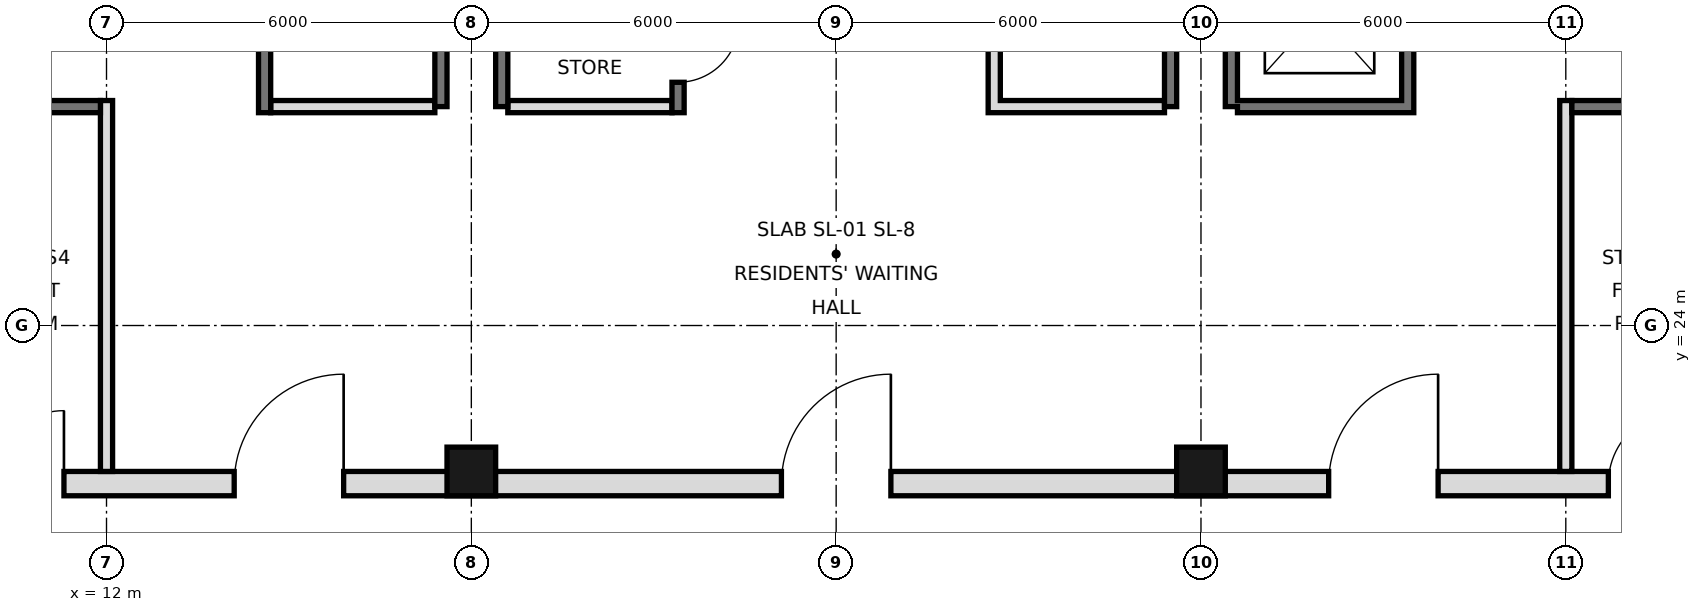
"""IFC4 building model, lengths in metres.
Left out: names, types, materials, properties, quantities, classifications, styles, units other than length and angle.
Written with IfcOpenShell. Run it as: python <this file> out.ifc"""

import sys

from ifc_helpers import new_model, si_unit, direction, frame, frame_2d, origin, origin_2d, place, context, subcontext, project, spatial, rectangle, hollow_rectangle, extrude, element, fill, save


model = new_model("IFC4")
c1 = context("Model", 3, precision=1e-05, world=origin(), true_north=direction((0.0, 1.0)))
c2 = subcontext(c1, "Body", "Model", "MODEL_VIEW")
j1 = project(units=[si_unit("LENGTHUNIT", "METRE"), si_unit("PLANEANGLEUNIT", "RADIAN")], contexts=[c1])
p1 = place(None, origin())
s1 = spatial("IfcSite", under=j1, at=p1, CompositionType="ELEMENT")
p2 = place(p1, origin())
s2 = spatial("IfcBuilding", under=s1, at=p2, CompositionType="ELEMENT")
p3 = place(p2, frame((0.0, 0.0, 257.6)))
s3 = spatial("IfcBuildingStorey", under=s2, at=p3, CompositionType="ELEMENT", Elevation=257.6)
for number, where, z_axis, x_axis in (
    (1, (18.0, 21.6, 0.0), (0.0, 0.0, 1.0), (1.0, 0.0, 0.0)),
    (2, (30.0, 21.6, 0.0), (0.0, 0.0, 1.0), (1.0, 0.0, 0.0)),
):
    element("IfcColumn", number, at=place(p3, frame(where, z_axis=z_axis, x_axis=x_axis)), inside=s3, PredefinedType="COLUMN", context=c2, shape_type="SweptSolid", body=[
        extrude(hollow_rectangle(XDim=0.8, YDim=0.8, WallThickness=0.032, at=origin_2d()), origin(), (0.0, 0.0, 1.0), 5.4),
    ])
for number, where, z_axis, x_axis in (
    (3, (17.5, 27.6, 0.0), (0.0, 0.0, 1.0), (0.0, 1.0, 0.0)),
    (4, (18.5, 27.6, 0.0), (0.0, 0.0, 1.0), (0.0, 1.0, 0.0)),
    (5, (29.5, 27.6, 0.0), (0.0, 0.0, 1.0), (0.0, 1.0, 0.0)),
    (6, (30.5, 27.6, 0.0), (0.0, 0.0, 1.0), (0.0, 1.0, 0.0)),
):
    element("IfcWall", number, at=place(p3, frame(where, z_axis=z_axis, x_axis=x_axis)), inside=s3, PredefinedType="SOLIDWALL", context=c2, shape_type="SweptSolid", body=[
        extrude(rectangle(XDim=17.5, YDim=0.2, at=frame_2d((8.75, 0.0))), origin(), (0.0, 0.0, 1.0), 5.22),
    ])
p4 = place(p3, frame((5.6, 21.4, 0.0), z_axis=(0.0, 0.0, 1.0), x_axis=(1.0, 0.0, 0.0)))
e7 = element("IfcWall", 7, at=p4, inside=s3, PredefinedType="SOLIDWALL", context=c2, shape_type="SweptSolid", body=[
    extrude(rectangle(XDim=36.8, YDim=0.4, at=frame_2d((18.4, 0.0))), origin(), (0.0, 0.0, 1.0), 5.22),
])
p5 = place(p4, frame((8.5, 0.0, 0.0)))
e8 = element("IfcOpeningElement", 8, at=p5, cuts=e7, PredefinedType="OPENING", context=c2, shape_type="SweptSolid", body=[
    extrude(rectangle(XDim=1.8, YDim=2.1, at=frame_2d((0.9, 1.05))), frame((0.0, 0.21, 0.0), z_axis=(0.0, -1.0, 0.0), x_axis=(1.0, 0.0, 0.0)), (0.0, 0.0, 1.0), 0.42),
])
p6 = place(p4, frame((17.5, 0.0, 0.0)))
e9 = element("IfcOpeningElement", 9, at=p6, cuts=e7, PredefinedType="OPENING", context=c2, shape_type="SweptSolid", body=[
    extrude(rectangle(XDim=1.8, YDim=2.1, at=frame_2d((0.9, 1.05))), frame((0.0, 0.21, 0.0), z_axis=(0.0, -1.0, 0.0), x_axis=(1.0, 0.0, 0.0)), (0.0, 0.0, 1.0), 0.42),
])
p7 = place(p4, frame((26.5, 0.0, 0.0)))
e10 = element("IfcOpeningElement", 10, at=p7, cuts=e7, PredefinedType="OPENING", context=c2, shape_type="SweptSolid", body=[
    extrude(rectangle(XDim=1.8, YDim=2.1, at=frame_2d((0.9, 1.05))), frame((0.0, 0.21, 0.0), z_axis=(0.0, -1.0, 0.0), x_axis=(1.0, 0.0, 0.0)), (0.0, 0.0, 1.0), 0.42),
])
p8 = place(p4, frame((4.5, 0.0, 0.0)))
e11 = element("IfcOpeningElement", 11, at=p8, cuts=e7, PredefinedType="OPENING", context=c2, shape_type="SweptSolid", body=[
    extrude(rectangle(XDim=1.2, YDim=2.1, at=frame_2d((0.6, 1.05))), frame((0.0, 0.21, 0.0), z_axis=(0.0, -1.0, 0.0), x_axis=(1.0, 0.0, 0.0)), (0.0, 0.0, 1.0), 0.42),
])
p9 = place(p4, frame((31.1, 0.0, 0.0)))
e12 = element("IfcOpeningElement", 12, at=p9, cuts=e7, PredefinedType="OPENING", context=c2, shape_type="SweptSolid", body=[
    extrude(rectangle(XDim=1.2, YDim=2.1, at=frame_2d((0.6, 1.05))), frame((0.0, 0.21, 0.0), z_axis=(0.0, -1.0, 0.0), x_axis=(1.0, 0.0, 0.0)), (0.0, 0.0, 1.0), 0.42),
])
p10 = place(p3, frame((12.0, 21.6, 0.0), z_axis=(0.0, 0.0, 1.0), x_axis=(0.0, 1.0, 0.0)))
e13 = element("IfcWall", 13, at=p10, inside=s3, PredefinedType="PARTITIONING", context=c2, shape_type="SweptSolid", body=[
    extrude(rectangle(XDim=6.1, YDim=0.2, at=frame_2d((3.05, 0.0))), origin(), (0.0, 0.0, 1.0), 5.22),
])
p11 = place(p3, frame((14.6, 27.5, 0.0), z_axis=(0.0, 0.0, 1.0), x_axis=(0.0, 1.0, 0.0)))
e14 = element("IfcWall", 14, at=p11, inside=s3, PredefinedType="SOLIDWALL", context=c2, shape_type="SweptSolid", body=[
    extrude(rectangle(XDim=17.5, YDim=0.2, at=frame_2d((8.75, 0.0))), origin(), (0.0, 0.0, 1.0), 5.22),
])
p12 = place(p11, frame((15.4, 0.0, 0.0)))
e15 = element("IfcOpeningElement", 15, at=p12, cuts=e14, PredefinedType="OPENING", context=c2, shape_type="SweptSolid", body=[
    extrude(rectangle(XDim=1.1, YDim=2.1, at=frame_2d((0.55, 1.05))), frame((0.0, 0.11, 0.0), z_axis=(0.0, -1.0, 0.0), x_axis=(1.0, 0.0, 0.0)), (0.0, 0.0, 1.0), 0.22),
])
p13 = place(p11, frame((2.7, 0.0, 0.0)))
e16 = element("IfcOpeningElement", 16, at=p13, cuts=e14, PredefinedType="OPENING", context=c2, shape_type="SweptSolid", body=[
    extrude(rectangle(XDim=1.0, YDim=2.1, at=frame_2d((0.5, 1.05))), frame((0.0, 0.11, 0.0), z_axis=(0.0, -1.0, 0.0), x_axis=(1.0, 0.0, 0.0)), (0.0, 0.0, 1.0), 0.22),
])
p14 = place(p11, frame((9.9, 0.0, 0.0)))
e17 = element("IfcOpeningElement", 17, at=p14, cuts=e14, PredefinedType="OPENING", context=c2, shape_type="SweptSolid", body=[
    extrude(rectangle(XDim=0.9, YDim=2.1, at=frame_2d((0.45, 1.05))), frame((0.0, 0.11, 0.0), z_axis=(0.0, -1.0, 0.0), x_axis=(1.0, 0.0, 0.0)), (0.0, 0.0, 1.0), 0.22),
])
p15 = place(p3, frame((21.4, 27.5, 0.0), z_axis=(0.0, 0.0, 1.0), x_axis=(0.0, 1.0, 0.0)))
e18 = element("IfcWall", 18, at=p15, inside=s3, PredefinedType="SOLIDWALL", context=c2, shape_type="SweptSolid", body=[
    extrude(rectangle(XDim=17.5, YDim=0.2, at=frame_2d((8.75, 0.0))), origin(), (0.0, 0.0, 1.0), 5.22),
])
p16 = place(p15, frame((0.5, 0.0, 0.0)))
e19 = element("IfcOpeningElement", 19, at=p16, cuts=e18, PredefinedType="OPENING", context=c2, shape_type="SweptSolid", body=[
    extrude(rectangle(XDim=1.0, YDim=2.1, at=frame_2d((0.5, 1.05))), frame((0.0, 0.11, 0.0), z_axis=(0.0, -1.0, 0.0), x_axis=(1.0, 0.0, 0.0)), (0.0, 0.0, 1.0), 0.22),
])
p17 = place(p15, frame((3.6, 0.0, 0.0)))
e20 = element("IfcOpeningElement", 20, at=p17, cuts=e18, PredefinedType="OPENING", context=c2, shape_type="SweptSolid", body=[
    extrude(rectangle(XDim=1.0, YDim=2.1, at=frame_2d((0.5, 1.05))), frame((0.0, 0.11, 0.0), z_axis=(0.0, -1.0, 0.0), x_axis=(1.0, 0.0, 0.0)), (0.0, 0.0, 1.0), 0.22),
])
p18 = place(p15, frame((9.8, 0.0, 0.0)))
e21 = element("IfcOpeningElement", 21, at=p18, cuts=e18, PredefinedType="OPENING", context=c2, shape_type="SweptSolid", body=[
    extrude(rectangle(XDim=1.0, YDim=2.1, at=frame_2d((0.5, 1.05))), frame((0.0, 0.11, 0.0), z_axis=(0.0, -1.0, 0.0), x_axis=(1.0, 0.0, 0.0)), (0.0, 0.0, 1.0), 0.22),
])
p19 = place(p15, frame((7.4, 0.0, 0.0)))
e22 = element("IfcOpeningElement", 22, at=p19, cuts=e18, PredefinedType="OPENING", context=c2, shape_type="SweptSolid", body=[
    extrude(rectangle(XDim=0.9, YDim=2.1, at=frame_2d((0.45, 1.05))), frame((0.0, 0.11, 0.0), z_axis=(0.0, -1.0, 0.0), x_axis=(1.0, 0.0, 0.0)), (0.0, 0.0, 1.0), 0.22),
])
p20 = place(p3, frame((26.6, 27.5, 0.0), z_axis=(0.0, 0.0, 1.0), x_axis=(0.0, 1.0, 0.0)))
e23 = element("IfcWall", 23, at=p20, inside=s3, PredefinedType="SOLIDWALL", context=c2, shape_type="SweptSolid", body=[
    extrude(rectangle(XDim=17.5, YDim=0.2, at=frame_2d((8.75, 0.0))), origin(), (0.0, 0.0, 1.0), 5.22),
])
p21 = place(p20, frame((4.3, 0.0, 0.0)))
e24 = element("IfcOpeningElement", 24, at=p21, cuts=e23, PredefinedType="OPENING", context=c2, shape_type="SweptSolid", body=[
    extrude(rectangle(XDim=0.9, YDim=2.1, at=frame_2d((0.45, 1.05))), frame((0.0, 0.11, 0.0), z_axis=(0.0, -1.0, 0.0), x_axis=(1.0, 0.0, 0.0)), (0.0, 0.0, 1.0), 0.22),
])
p22 = place(p20, frame((10.35, 0.0, 0.0)))
e25 = element("IfcOpeningElement", 25, at=p22, cuts=e23, PredefinedType="OPENING", context=c2, shape_type="SweptSolid", body=[
    extrude(rectangle(XDim=1.0, YDim=2.1, at=frame_2d((0.5, 1.05))), frame((0.0, 0.11, 0.0), z_axis=(0.0, -1.0, 0.0), x_axis=(1.0, 0.0, 0.0)), (0.0, 0.0, 1.0), 0.22),
])
p23 = place(p20, frame((14.575, 0.0, 0.0)))
e26 = element("IfcOpeningElement", 26, at=p23, cuts=e23, PredefinedType="OPENING", context=c2, shape_type="SweptSolid", body=[
    extrude(rectangle(XDim=1.0, YDim=2.1, at=frame_2d((0.5, 1.05))), frame((0.0, 0.11, 0.0), z_axis=(0.0, -1.0, 0.0), x_axis=(1.0, 0.0, 0.0)), (0.0, 0.0, 1.0), 0.22),
])
p24 = place(p3, frame((33.4, 27.5, 0.0), z_axis=(0.0, 0.0, 1.0), x_axis=(0.0, 1.0, 0.0)))
e27 = element("IfcWall", 27, at=p24, inside=s3, PredefinedType="SOLIDWALL", context=c2, shape_type="SweptSolid", body=[
    extrude(rectangle(XDim=17.5, YDim=0.2, at=frame_2d((8.75, 0.0))), origin(), (0.0, 0.0, 1.0), 5.22),
])
p25 = place(p24, frame((1.1, 0.0, 0.0)))
e28 = element("IfcOpeningElement", 28, at=p25, cuts=e27, PredefinedType="OPENING", context=c2, shape_type="SweptSolid", body=[
    extrude(rectangle(XDim=1.1, YDim=2.1, at=frame_2d((0.55, 1.05))), frame((0.0, 0.11, 0.0), z_axis=(0.0, -1.0, 0.0), x_axis=(1.0, 0.0, 0.0)), (0.0, 0.0, 1.0), 0.22),
])
p26 = place(p24, frame((4.2, 0.0, 0.0)))
e29 = element("IfcOpeningElement", 29, at=p26, cuts=e27, PredefinedType="OPENING", context=c2, shape_type="SweptSolid", body=[
    extrude(rectangle(XDim=1.1, YDim=2.1, at=frame_2d((0.55, 1.05))), frame((0.0, 0.11, 0.0), z_axis=(0.0, -1.0, 0.0), x_axis=(1.0, 0.0, 0.0)), (0.0, 0.0, 1.0), 0.22),
])
p27 = place(p24, frame((15.4, 0.0, 0.0)))
e30 = element("IfcOpeningElement", 30, at=p27, cuts=e27, PredefinedType="OPENING", context=c2, shape_type="SweptSolid", body=[
    extrude(rectangle(XDim=1.1, YDim=2.1, at=frame_2d((0.55, 1.05))), frame((0.0, 0.11, 0.0), z_axis=(0.0, -1.0, 0.0), x_axis=(1.0, 0.0, 0.0)), (0.0, 0.0, 1.0), 0.22),
])
p28 = place(p24, frame((9.9, 0.0, 0.0)))
e31 = element("IfcOpeningElement", 31, at=p28, cuts=e27, PredefinedType="OPENING", context=c2, shape_type="SweptSolid", body=[
    extrude(rectangle(XDim=0.9, YDim=2.1, at=frame_2d((0.45, 1.05))), frame((0.0, 0.11, 0.0), z_axis=(0.0, -1.0, 0.0), x_axis=(1.0, 0.0, 0.0)), (0.0, 0.0, 1.0), 0.22),
])
p29 = place(p3, frame((36.0, 21.6, 0.0), z_axis=(0.0, 0.0, 1.0), x_axis=(0.0, 1.0, 0.0)))
e32 = element("IfcWall", 32, at=p29, inside=s3, PredefinedType="PARTITIONING", context=c2, shape_type="SweptSolid", body=[
    extrude(rectangle(XDim=6.1, YDim=0.2, at=frame_2d((3.05, 0.0))), origin(), (0.0, 0.0, 1.0), 5.22),
])
for number, where, z_axis, x_axis in (
    (33, (14.7, 27.6, 0.0), (0.0, 0.0, 1.0), (1.0, 0.0, 0.0)),
    (34, (18.6, 27.6, 0.0), (0.0, 0.0, 1.0), (1.0, 0.0, 0.0)),
):
    element("IfcWall", number, at=place(p3, frame(where, z_axis=z_axis, x_axis=x_axis)), inside=s3, PredefinedType="PARTITIONING", context=c2, shape_type="SweptSolid", body=[
        extrude(rectangle(XDim=2.7, YDim=0.2, at=frame_2d((1.35, 0.0))), origin(), (0.0, 0.0, 1.0), 5.22),
    ])
for number, where, z_axis, x_axis in (
    (35, (26.7, 27.6, 0.0), (0.0, 0.0, 1.0), (1.0, 0.0, 0.0)),
    (36, (30.6, 27.6, 0.0), (0.0, 0.0, 1.0), (1.0, 0.0, 0.0)),
):
    element("IfcWall", number, at=place(p3, frame(where, z_axis=z_axis, x_axis=x_axis)), inside=s3, PredefinedType="SOLIDWALL", context=c2, shape_type="SweptSolid", body=[
        extrude(rectangle(XDim=2.7, YDim=0.2, at=frame_2d((1.35, 0.0))), origin(), (0.0, 0.0, 1.0), 5.22),
    ])
for number, where, z_axis, x_axis in (
    (37, (36.1, 27.6, 0.0), (0.0, 0.0, 1.0), (1.0, 0.0, 0.0)),
    (38, (6.6, 27.6, 0.0), (0.0, 0.0, 1.0), (1.0, 0.0, 0.0)),
):
    element("IfcWall", number, at=place(p3, frame(where, z_axis=z_axis, x_axis=x_axis)), inside=s3, PredefinedType="SOLIDWALL", context=c2, shape_type="SweptSolid", body=[
        extrude(rectangle(XDim=5.3, YDim=0.2, at=frame_2d((2.65, 0.0))), origin(), (0.0, 0.0, 1.0), 5.22),
    ])
p30 = place(p5, frame((1.8, 0.0, 0.0), z_axis=(0.0, 0.0, 1.0), x_axis=(-1.0, 0.0, 0.0)))
e39 = element("IfcDoor", 39, at=p30, inside=s3, OperationType="SINGLE_SWING_LEFT", PredefinedType="DOOR", context=c2, shape_type="SweptSolid", body=[
    extrude(rectangle(XDim=1.8, YDim=2.1, at=frame_2d((0.9, 1.05))), frame((0.0, 0.025, 0.0), z_axis=(0.0, -1.0, 0.0), x_axis=(1.0, 0.0, 0.0)), (0.0, 0.0, 1.0), 0.05),
])
fill(e8, e39)
p31 = place(p6, frame((1.8, 0.0, 0.0), z_axis=(0.0, 0.0, 1.0), x_axis=(-1.0, 0.0, 0.0)))
e40 = element("IfcDoor", 40, at=p31, inside=s3, OperationType="SINGLE_SWING_LEFT", PredefinedType="DOOR", context=c2, shape_type="SweptSolid", body=[
    extrude(rectangle(XDim=1.8, YDim=2.1, at=frame_2d((0.9, 1.05))), frame((0.0, 0.025, 0.0), z_axis=(0.0, -1.0, 0.0), x_axis=(1.0, 0.0, 0.0)), (0.0, 0.0, 1.0), 0.05),
])
fill(e9, e40)
p32 = place(p7, frame((1.8, 0.0, 0.0), z_axis=(0.0, 0.0, 1.0), x_axis=(-1.0, 0.0, 0.0)))
e41 = element("IfcDoor", 41, at=p32, inside=s3, OperationType="SINGLE_SWING_LEFT", PredefinedType="DOOR", context=c2, shape_type="SweptSolid", body=[
    extrude(rectangle(XDim=1.8, YDim=2.1, at=frame_2d((0.9, 1.05))), frame((0.0, 0.025, 0.0), z_axis=(0.0, -1.0, 0.0), x_axis=(1.0, 0.0, 0.0)), (0.0, 0.0, 1.0), 0.05),
])
fill(e10, e41)
p33 = place(p8, frame((1.2, 0.0, 0.0), z_axis=(0.0, 0.0, 1.0), x_axis=(-1.0, 0.0, 0.0)))
e42 = element("IfcDoor", 42, at=p33, inside=s3, OperationType="SINGLE_SWING_LEFT", PredefinedType="DOOR", context=c2, shape_type="SweptSolid", body=[
    extrude(rectangle(XDim=1.2, YDim=2.1, at=frame_2d((0.6, 1.05))), frame((0.0, 0.025, 0.0), z_axis=(0.0, -1.0, 0.0), x_axis=(1.0, 0.0, 0.0)), (0.0, 0.0, 1.0), 0.05),
])
fill(e11, e42)
p34 = place(p9, frame((1.2, 0.0, 0.0), z_axis=(0.0, 0.0, 1.0), x_axis=(-1.0, 0.0, 0.0)))
e43 = element("IfcDoor", 43, at=p34, inside=s3, OperationType="SINGLE_SWING_LEFT", PredefinedType="DOOR", context=c2, shape_type="SweptSolid", body=[
    extrude(rectangle(XDim=1.2, YDim=2.1, at=frame_2d((0.6, 1.05))), frame((0.0, 0.025, 0.0), z_axis=(0.0, -1.0, 0.0), x_axis=(1.0, 0.0, 0.0)), (0.0, 0.0, 1.0), 0.05),
])
fill(e12, e43)
p35 = place(p16, origin())
e44 = element("IfcDoor", 44, at=p35, inside=s3, OperationType="SINGLE_SWING_RIGHT", PredefinedType="DOOR", context=c2, shape_type="SweptSolid", body=[
    extrude(rectangle(XDim=1.0, YDim=2.1, at=frame_2d((0.5, 1.05))), frame((0.0, 0.025, 0.0), z_axis=(0.0, -1.0, 0.0), x_axis=(1.0, 0.0, 0.0)), (0.0, 0.0, 1.0), 0.05),
])
fill(e19, e44)
save(model, sys.argv[1])
